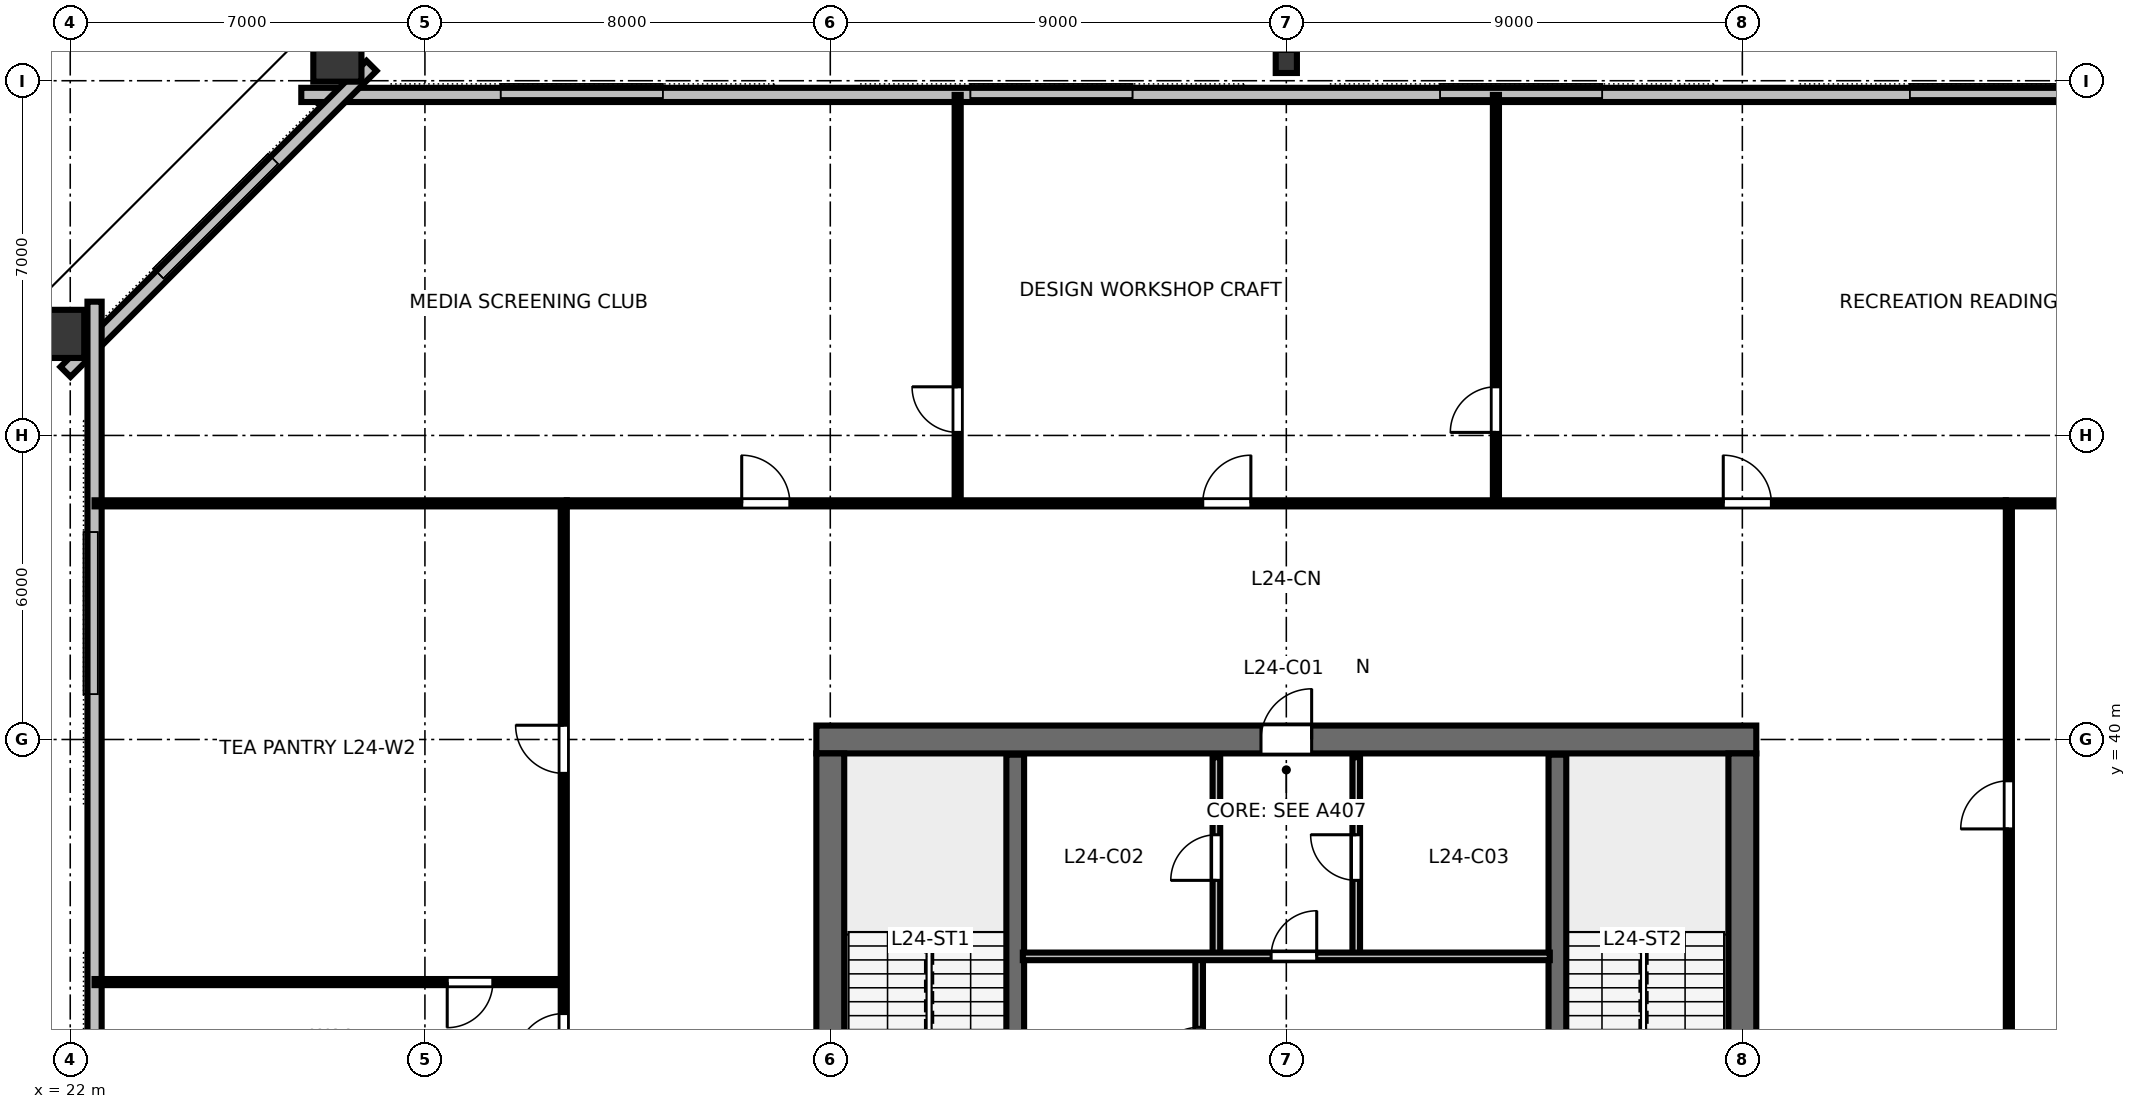
"""IFC4 building model, lengths in metres.
Left out: names, types, materials, properties, quantities, classifications, styles, units other than length and angle.
Written with IfcOpenShell. Run it as: python <this file> out.ifc"""

import sys

from ifc_helpers import new_model, si_unit, direction, frame, frame_2d, origin, origin_2d, place, context, subcontext, project, spatial, rectangle, hollow_rectangle, i_section, extrude, element, fill, save


model = new_model("IFC4")
c1 = context("Model", 3, precision=1e-05, world=origin(), true_north=direction((0.0, 1.0)))
c2 = subcontext(c1, "Body", "Model", "MODEL_VIEW")
j1 = project(units=[si_unit("LENGTHUNIT", "METRE"), si_unit("PLANEANGLEUNIT", "RADIAN")], contexts=[c1])
p1 = place(None, origin())
s1 = spatial("IfcSite", under=j1, at=p1, CompositionType="ELEMENT")
p2 = place(p1, origin())
s2 = spatial("IfcBuilding", under=s1, at=p2, CompositionType="ELEMENT")
p3 = place(p2, frame((0.0, 0.0, 95.2)))
s3 = spatial("IfcBuildingStorey", under=s2, at=p3, CompositionType="ELEMENT", Elevation=95.2)
p4 = place(p3, frame((36.725, 40.0, 0.0), z_axis=(0.0, 0.0, 1.0), x_axis=(1.0, 0.0, 0.0)))
e1 = element("IfcWall", 1, at=p4, inside=s3, PredefinedType="SHEAR", context=c2, shape_type="SweptSolid", body=[
    extrude(rectangle(XDim=18.55, YDim=0.55, at=frame_2d((9.275, 0.0))), origin(), (0.0, 0.0, 1.0), 3.36),
])
p5 = place(p4, frame((8.775, 0.0, 0.0)))
e2 = element("IfcOpeningElement", 2, at=p5, cuts=e1, PredefinedType="OPENING", context=c2, shape_type="SweptSolid", body=[
    extrude(rectangle(XDim=1.0, YDim=2.15, at=frame_2d((0.5, 1.075))), frame((0.0, 0.285, 0.0), z_axis=(0.0, -1.0, 0.0), x_axis=(1.0, 0.0, 0.0)), (0.0, 0.0, 1.0), 0.57),
])
p6 = place(p3, frame((37.0, 24.275, 0.0), z_axis=(0.0, 0.0, 1.0), x_axis=(0.0, 1.0, 0.0)))
e3 = element("IfcWall", 3, at=p6, inside=s3, PredefinedType="SHEAR", context=c2, shape_type="SweptSolid", body=[
    extrude(rectangle(XDim=15.45, YDim=0.55, at=frame_2d((7.725, 0.0))), origin(), (0.0, 0.0, 1.0), 3.36),
])
p7 = place(p6, frame((5.25, 0.0, 0.0)))
e4 = element("IfcOpeningElement", 4, at=p7, cuts=e3, PredefinedType="OPENING", context=c2, shape_type="SweptSolid", body=[
    extrude(rectangle(XDim=1.15, YDim=2.15, at=frame_2d((0.575, 1.075))), frame((0.0, 0.285, 0.0), z_axis=(0.0, -1.0, 0.0), x_axis=(1.0, 0.0, 0.0)), (0.0, 0.0, 1.0), 0.57),
])
p8 = place(p3, frame((55.0, 24.275, 0.0), z_axis=(0.0, 0.0, 1.0), x_axis=(0.0, 1.0, 0.0)))
e5 = element("IfcWall", 5, at=p8, inside=s3, PredefinedType="SHEAR", context=c2, shape_type="SweptSolid", body=[
    extrude(rectangle(XDim=15.45, YDim=0.55, at=frame_2d((7.725, 0.0))), origin(), (0.0, 0.0, 1.0), 3.36),
])
p9 = place(p8, frame((5.25, 0.0, 0.0)))
e6 = element("IfcOpeningElement", 6, at=p9, cuts=e5, PredefinedType="OPENING", context=c2, shape_type="SweptSolid", body=[
    extrude(rectangle(XDim=1.15, YDim=2.15, at=frame_2d((0.575, 1.075))), frame((0.0, 0.285, 0.0), z_axis=(0.0, -1.0, 0.0), x_axis=(1.0, 0.0, 0.0)), (0.0, 0.0, 1.0), 0.57),
])
p10 = place(p3, frame((46.0, 53.38, 0.0), z_axis=(0.0, 0.0, 1.0), x_axis=(1.0, 0.0, 0.0)))
e7 = element("IfcColumn", 7, at=p10, inside=s3, PredefinedType="COLUMN", context=c2, shape_type="SweptSolid", body=[
    extrude(i_section(OverallWidth=0.418, OverallDepth=0.455, WebThickness=0.042, FlangeThickness=0.068, FilletRadius=0.025, at=origin_2d()), origin(), (0.0, 0.0, 1.0), 3.358),
])
for number, where, z_axis, x_axis in (
    (8, (27.272, 53.556, 0.0), (0.0, 0.0, 1.0), (1.0, 0.0, 0.0)),
    (9, (21.701, 48.004, 0.0), (0.0, 0.0, 1.0), (0.0, 1.0, 0.0)),
):
    element("IfcColumn", number, at=place(p3, frame(where, z_axis=z_axis, x_axis=x_axis)), inside=s3, PredefinedType="COLUMN", context=c2, shape_type="SweptSolid", body=[
        extrude(hollow_rectangle(XDim=0.95, YDim=1.15, WallThickness=0.06, at=origin_2d()), origin(), (0.0, 0.0, 1.0), 3.358),
    ])
p11 = place(p3, frame((65.44, 52.72, 0.0), z_axis=(0.0, 0.0, 1.0), x_axis=(-1.0, 0.0, 0.0)))
e10 = element("IfcWall", 10, at=p11, inside=s3, PredefinedType="STANDARD", context=c2, shape_type="SweptSolid", body=[
    extrude(rectangle(XDim=38.88, YDim=0.28, at=frame_2d((19.44, 0.0))), origin(), (0.0, 0.0, 1.0), 3.36),
])
p12 = place(p3, frame((27.946, 53.294, 0.0), z_axis=(0.0, 0.0, 1.0), x_axis=(-0.707106781187, -0.707106781187, 0.0)))
e11 = element("IfcWall", 11, at=p12, inside=s3, PredefinedType="STANDARD", context=c2, shape_type="SweptSolid", body=[
    extrude(rectangle(XDim=8.541, YDim=0.28, at=frame_2d((4.271, 0.0))), origin(), (0.0, 0.0, 1.0), 3.36),
])
p13 = place(p3, frame((22.48, 48.64, 0.0), z_axis=(0.0, 0.0, 1.0), x_axis=(0.0, -1.0, 0.0)))
e12 = element("IfcWall", 12, at=p13, inside=s3, PredefinedType="STANDARD", context=c2, shape_type="SweptSolid", body=[
    extrude(rectangle(XDim=33.28, YDim=0.28, at=frame_2d((16.64, 0.0))), origin(), (0.0, 0.0, 1.0), 3.36),
])
for number, where, z_axis, x_axis in (
    (13, (40.65, 32.0, 0.0), (0.0, 0.0, 1.0), (0.0, 1.0, 0.0)),
    (14, (51.35, 32.0, 0.0), (0.0, 0.0, 1.0), (0.0, 1.0, 0.0)),
):
    element("IfcWall", number, at=place(p3, frame(where, z_axis=z_axis, x_axis=x_axis)), inside=s3, PredefinedType="SHEAR", context=c2, shape_type="SweptSolid", body=[
        extrude(rectangle(XDim=7.7, YDim=0.35, at=frame_2d((3.85, 0.0))), origin(), (0.0, 0.0, 1.0), 3.6),
    ])
p14 = place(p3, frame((44.62, 35.72, 0.0), z_axis=(0.0, 0.0, 1.0), x_axis=(0.0, 1.0, 0.0)))
e15 = element("IfcWall", 15, at=p14, inside=s3, PredefinedType="PARTITIONING", context=c2, shape_type="SweptSolid", body=[
    extrude(rectangle(XDim=3.93, YDim=0.15, at=frame_2d((1.965, 0.0))), origin(), (0.0, 0.0, 1.0), 3.36),
])
p15 = place(p14, frame((1.5, 0.0, 0.0)))
e16 = element("IfcOpeningElement", 16, at=p15, cuts=e15, PredefinedType="OPENING", context=c2, shape_type="SweptSolid", body=[
    extrude(rectangle(XDim=0.9, YDim=2.15, at=frame_2d((0.45, 1.075))), frame((0.0, 0.085, 0.0), z_axis=(0.0, -1.0, 0.0), x_axis=(1.0, 0.0, 0.0)), (0.0, 0.0, 1.0), 0.17),
])
p16 = place(p3, frame((47.38, 35.72, 0.0), z_axis=(0.0, 0.0, 1.0), x_axis=(0.0, 1.0, 0.0)))
e17 = element("IfcWall", 17, at=p16, inside=s3, PredefinedType="PARTITIONING", context=c2, shape_type="SweptSolid", body=[
    extrude(rectangle(XDim=3.93, YDim=0.15, at=frame_2d((1.965, 0.0))), origin(), (0.0, 0.0, 1.0), 3.36),
])
p17 = place(p16, frame((1.5, 0.0, 0.0)))
e18 = element("IfcOpeningElement", 18, at=p17, cuts=e17, PredefinedType="OPENING", context=c2, shape_type="SweptSolid", body=[
    extrude(rectangle(XDim=0.9, YDim=2.15, at=frame_2d((0.45, 1.075))), frame((0.0, 0.085, 0.0), z_axis=(0.0, -1.0, 0.0), x_axis=(1.0, 0.0, 0.0)), (0.0, 0.0, 1.0), 0.17),
])
p18 = place(p3, frame((44.28, 32.05, 0.0), z_axis=(0.0, 0.0, 1.0), x_axis=(0.0, 1.0, 0.0)))
e19 = element("IfcWall", 19, at=p18, inside=s3, PredefinedType="PARTITIONING", context=c2, shape_type="SweptSolid", body=[
    extrude(rectangle(XDim=3.67, YDim=0.15, at=frame_2d((1.835, 0.0))), origin(), (0.0, 0.0, 1.0), 3.36),
])
p19 = place(p18, frame((1.35, 0.0, 0.0)))
e20 = element("IfcOpeningElement", 20, at=p19, cuts=e19, PredefinedType="OPENING", context=c2, shape_type="SweptSolid", body=[
    extrude(rectangle(XDim=0.92, YDim=2.15, at=frame_2d((0.46, 1.075))), frame((0.0, 0.085, 0.0), z_axis=(0.0, -1.0, 0.0), x_axis=(1.0, 0.0, 0.0)), (0.0, 0.0, 1.0), 0.17),
])
p20 = place(p3, frame((40.8, 35.72, 0.0), z_axis=(0.0, 0.0, 1.0), x_axis=(1.0, 0.0, 0.0)))
e21 = element("IfcWall", 21, at=p20, inside=s3, PredefinedType="PARTITIONING", context=c2, shape_type="SweptSolid", body=[
    extrude(rectangle(XDim=10.4, YDim=0.15, at=frame_2d((5.2, 0.0))), origin(), (0.0, 0.0, 1.0), 3.36),
])
p21 = place(p20, frame((4.9, 0.0, 0.0)))
e22 = element("IfcOpeningElement", 22, at=p21, cuts=e21, PredefinedType="OPENING", context=c2, shape_type="SweptSolid", body=[
    extrude(rectangle(XDim=0.9, YDim=2.15, at=frame_2d((0.45, 1.075))), frame((0.0, 0.085, 0.0), z_axis=(0.0, -1.0, 0.0), x_axis=(1.0, 0.0, 0.0)), (0.0, 0.0, 1.0), 0.17),
])
p22 = place(p3, frame((39.514, 44.66, 0.0), z_axis=(0.0, 0.0, 1.0), x_axis=(0.0, 1.0, 0.0)))
e23 = element("IfcWall", 23, at=p22, inside=s3, PredefinedType="PARTITIONING", context=c2, shape_type="SweptSolid", body=[
    extrude(rectangle(XDim=8.06, YDim=0.12, at=frame_2d((4.03, 0.0))), origin(), (0.0, 0.0, 1.0), 2.64),
])
p23 = place(p22, frame((1.4, 0.0, 0.0)))
e24 = element("IfcOpeningElement", 24, at=p23, cuts=e23, PredefinedType="OPENING", context=c2, shape_type="SweptSolid", body=[
    extrude(rectangle(XDim=0.9, YDim=2.15, at=frame_2d((0.45, 1.075))), frame((0.0, 0.07, 0.0), z_axis=(0.0, -1.0, 0.0), x_axis=(1.0, 0.0, 0.0)), (0.0, 0.0, 1.0), 0.14),
])
p24 = place(p3, frame((50.137, 44.66, 0.0), z_axis=(0.0, 0.0, 1.0), x_axis=(0.0, 1.0, 0.0)))
e25 = element("IfcWall", 25, at=p24, inside=s3, PredefinedType="PARTITIONING", context=c2, shape_type="SweptSolid", body=[
    extrude(rectangle(XDim=8.06, YDim=0.12, at=frame_2d((4.03, 0.0))), origin(), (0.0, 0.0, 1.0), 2.64),
])
p25 = place(p24, frame((1.4, 0.0, 0.0)))
e26 = element("IfcOpeningElement", 26, at=p25, cuts=e25, PredefinedType="OPENING", context=c2, shape_type="SweptSolid", body=[
    extrude(rectangle(XDim=0.9, YDim=2.15, at=frame_2d((0.45, 1.075))), frame((0.0, 0.07, 0.0), z_axis=(0.0, -1.0, 0.0), x_axis=(1.0, 0.0, 0.0)), (0.0, 0.0, 1.0), 0.14),
])
p26 = place(p3, frame((31.8, 44.66, 0.0), z_axis=(0.0, 0.0, 1.0), x_axis=(1.0, 0.0, 0.0)))
e27 = element("IfcWall", 27, at=p26, inside=s3, PredefinedType="PARTITIONING", context=c2, shape_type="SweptSolid", body=[
    extrude(rectangle(XDim=28.4, YDim=0.12, at=frame_2d((14.2, 0.0))), origin(), (0.0, 0.0, 1.0), 2.64),
])
p27 = place(p26, frame((3.452, 0.0, 0.0)))
e28 = element("IfcOpeningElement", 28, at=p27, cuts=e27, PredefinedType="OPENING", context=c2, shape_type="SweptSolid", body=[
    extrude(rectangle(XDim=0.95, YDim=2.15, at=frame_2d((0.475, 1.075))), frame((0.0, 0.07, 0.0), z_axis=(0.0, -1.0, 0.0), x_axis=(1.0, 0.0, 0.0)), (0.0, 0.0, 1.0), 0.14),
])
p28 = place(p26, frame((12.551, 0.0, 0.0)))
e29 = element("IfcOpeningElement", 29, at=p28, cuts=e27, PredefinedType="OPENING", context=c2, shape_type="SweptSolid", body=[
    extrude(rectangle(XDim=0.95, YDim=2.15, at=frame_2d((0.475, 1.075))), frame((0.0, 0.07, 0.0), z_axis=(0.0, -1.0, 0.0), x_axis=(1.0, 0.0, 0.0)), (0.0, 0.0, 1.0), 0.14),
])
p29 = place(p26, frame((22.823, 0.0, 0.0)))
e30 = element("IfcOpeningElement", 30, at=p29, cuts=e27, PredefinedType="OPENING", context=c2, shape_type="SweptSolid", body=[
    extrude(rectangle(XDim=0.95, YDim=2.15, at=frame_2d((0.475, 1.075))), frame((0.0, 0.07, 0.0), z_axis=(0.0, -1.0, 0.0), x_axis=(1.0, 0.0, 0.0)), (0.0, 0.0, 1.0), 0.14),
])
p30 = place(p3, frame((31.74, 35.213, 0.0), z_axis=(0.0, 0.0, 1.0), x_axis=(-1.0, 0.0, 0.0)))
e31 = element("IfcWall", 31, at=p30, inside=s3, PredefinedType="PARTITIONING", context=c2, shape_type="SweptSolid", body=[
    extrude(rectangle(XDim=9.26, YDim=0.12, at=frame_2d((4.63, 0.0))), origin(), (0.0, 0.0, 1.0), 2.64),
])
p31 = place(p30, frame((1.4, 0.0, 0.0)))
e32 = element("IfcOpeningElement", 32, at=p31, cuts=e31, PredefinedType="OPENING", context=c2, shape_type="SweptSolid", body=[
    extrude(rectangle(XDim=0.9, YDim=2.15, at=frame_2d((0.45, 1.075))), frame((0.0, 0.07, 0.0), z_axis=(0.0, -1.0, 0.0), x_axis=(1.0, 0.0, 0.0)), (0.0, 0.0, 1.0), 0.14),
])
p32 = place(p3, frame((31.74, 33.02, 0.0), z_axis=(0.0, 0.0, 1.0), x_axis=(0.0, 1.0, 0.0)))
e33 = element("IfcWall", 33, at=p32, inside=s3, PredefinedType="PARTITIONING", context=c2, shape_type="SweptSolid", body=[
    extrude(rectangle(XDim=11.58, YDim=0.12, at=frame_2d((5.79, 0.0))), origin(), (0.0, 0.0, 1.0), 2.64),
])
p33 = place(p32, frame((0.621, 0.0, 0.0)))
e34 = element("IfcOpeningElement", 34, at=p33, cuts=e33, PredefinedType="OPENING", context=c2, shape_type="SweptSolid", body=[
    extrude(rectangle(XDim=0.95, YDim=2.15, at=frame_2d((0.475, 1.075))), frame((0.0, 0.07, 0.0), z_axis=(0.0, -1.0, 0.0), x_axis=(1.0, 0.0, 0.0)), (0.0, 0.0, 1.0), 0.14),
])
p34 = place(p32, frame((6.311, 0.0, 0.0)))
e35 = element("IfcOpeningElement", 35, at=p34, cuts=e33, PredefinedType="OPENING", context=c2, shape_type="SweptSolid", body=[
    extrude(rectangle(XDim=0.95, YDim=2.15, at=frame_2d((0.475, 1.075))), frame((0.0, 0.07, 0.0), z_axis=(0.0, -1.0, 0.0), x_axis=(1.0, 0.0, 0.0)), (0.0, 0.0, 1.0), 0.14),
])
p35 = place(p3, frame((60.26, 33.02, 0.0), z_axis=(0.0, 0.0, 1.0), x_axis=(0.0, 1.0, 0.0)))
e36 = element("IfcWall", 36, at=p35, inside=s3, PredefinedType="PARTITIONING", context=c2, shape_type="SweptSolid", body=[
    extrude(rectangle(XDim=11.58, YDim=0.12, at=frame_2d((5.79, 0.0))), origin(), (0.0, 0.0, 1.0), 2.64),
])
p36 = place(p35, frame((5.215, 0.0, 0.0)))
e37 = element("IfcOpeningElement", 37, at=p36, cuts=e36, PredefinedType="OPENING", context=c2, shape_type="SweptSolid", body=[
    extrude(rectangle(XDim=0.95, YDim=2.15, at=frame_2d((0.475, 1.075))), frame((0.0, 0.07, 0.0), z_axis=(0.0, -1.0, 0.0), x_axis=(1.0, 0.0, 0.0)), (0.0, 0.0, 1.0), 0.14),
])
for number, where, z_axis, x_axis in (
    (38, (31.8, 44.66, 0.0), (0.0, 0.0, 1.0), (-1.0, 0.0, 0.0)),
    (39, (60.2, 44.66, 0.0), (0.0, 0.0, 1.0), (1.0, 0.0, 0.0)),
):
    element("IfcWall", number, at=place(p3, frame(where, z_axis=z_axis, x_axis=x_axis)), inside=s3, PredefinedType="PARTITIONING", context=c2, shape_type="SweptSolid", body=[
        extrude(rectangle(XDim=9.32, YDim=0.12, at=frame_2d((4.66, 0.0))), origin(), (0.0, 0.0, 1.0), 2.64),
    ])
p37 = place(p5, origin())
e40 = element("IfcDoor", 40, at=p37, inside=s3, OperationType="SINGLE_SWING_RIGHT", PredefinedType="DOOR", context=c2, shape_type="SweptSolid", body=[
    extrude(rectangle(XDim=1.0, YDim=2.15, at=frame_2d((0.5, 1.075))), frame((0.0, 0.025, 0.0), z_axis=(0.0, -1.0, 0.0), x_axis=(1.0, 0.0, 0.0)), (0.0, 0.0, 1.0), 0.05),
])
fill(e2, e40)
p38 = place(p15, origin())
e41 = element("IfcDoor", 41, at=p38, inside=s3, OperationType="SINGLE_SWING_LEFT", PredefinedType="DOOR", context=c2, shape_type="SweptSolid", body=[
    extrude(rectangle(XDim=0.9, YDim=2.15, at=frame_2d((0.45, 1.075))), frame((0.0, 0.025, 0.0), z_axis=(0.0, -1.0, 0.0), x_axis=(1.0, 0.0, 0.0)), (0.0, 0.0, 1.0), 0.05),
])
fill(e16, e41)
p39 = place(p17, origin())
e42 = element("IfcDoor", 42, at=p39, inside=s3, OperationType="SINGLE_SWING_RIGHT", PredefinedType="DOOR", context=c2, shape_type="SweptSolid", body=[
    extrude(rectangle(XDim=0.9, YDim=2.15, at=frame_2d((0.45, 1.075))), frame((0.0, 0.025, 0.0), z_axis=(0.0, -1.0, 0.0), x_axis=(1.0, 0.0, 0.0)), (0.0, 0.0, 1.0), 0.05),
])
fill(e18, e42)
p40 = place(p19, origin())
e43 = element("IfcDoor", 43, at=p40, inside=s3, OperationType="SINGLE_SWING_LEFT", PredefinedType="DOOR", context=c2, shape_type="SweptSolid", body=[
    extrude(rectangle(XDim=0.92, YDim=2.15, at=frame_2d((0.46, 1.075))), frame((0.0, 0.025, 0.0), z_axis=(0.0, -1.0, 0.0), x_axis=(1.0, 0.0, 0.0)), (0.0, 0.0, 1.0), 0.05),
])
fill(e20, e43)
p41 = place(p21, origin())
e44 = element("IfcDoor", 44, at=p41, inside=s3, OperationType="SINGLE_SWING_RIGHT", PredefinedType="DOOR", context=c2, shape_type="SweptSolid", body=[
    extrude(rectangle(XDim=0.9, YDim=2.15, at=frame_2d((0.45, 1.075))), frame((0.0, 0.025, 0.0), z_axis=(0.0, -1.0, 0.0), x_axis=(1.0, 0.0, 0.0)), (0.0, 0.0, 1.0), 0.05),
])
fill(e22, e44)
p42 = place(p23, origin())
e45 = element("IfcDoor", 45, at=p42, inside=s3, OperationType="SINGLE_SWING_RIGHT", PredefinedType="DOOR", context=c2, shape_type="SweptSolid", body=[
    extrude(rectangle(XDim=0.9, YDim=2.15, at=frame_2d((0.45, 1.075))), frame((0.0, 0.025, 0.0), z_axis=(0.0, -1.0, 0.0), x_axis=(1.0, 0.0, 0.0)), (0.0, 0.0, 1.0), 0.05),
])
fill(e24, e45)
p43 = place(p25, origin())
e46 = element("IfcDoor", 46, at=p43, inside=s3, OperationType="SINGLE_SWING_LEFT", PredefinedType="DOOR", context=c2, shape_type="SweptSolid", body=[
    extrude(rectangle(XDim=0.9, YDim=2.15, at=frame_2d((0.45, 1.075))), frame((0.0, 0.025, 0.0), z_axis=(0.0, -1.0, 0.0), x_axis=(1.0, 0.0, 0.0)), (0.0, 0.0, 1.0), 0.05),
])
fill(e26, e46)
p44 = place(p27, origin())
e47 = element("IfcDoor", 47, at=p44, inside=s3, OperationType="SINGLE_SWING_LEFT", PredefinedType="DOOR", context=c2, shape_type="SweptSolid", body=[
    extrude(rectangle(XDim=0.95, YDim=2.15, at=frame_2d((0.475, 1.075))), frame((0.0, 0.025, 0.0), z_axis=(0.0, -1.0, 0.0), x_axis=(1.0, 0.0, 0.0)), (0.0, 0.0, 1.0), 0.05),
])
fill(e28, e47)
p45 = place(p28, origin())
e48 = element("IfcDoor", 48, at=p45, inside=s3, OperationType="SINGLE_SWING_RIGHT", PredefinedType="DOOR", context=c2, shape_type="SweptSolid", body=[
    extrude(rectangle(XDim=0.95, YDim=2.15, at=frame_2d((0.475, 1.075))), frame((0.0, 0.025, 0.0), z_axis=(0.0, -1.0, 0.0), x_axis=(1.0, 0.0, 0.0)), (0.0, 0.0, 1.0), 0.05),
])
fill(e29, e48)
p46 = place(p29, origin())
e49 = element("IfcDoor", 49, at=p46, inside=s3, OperationType="SINGLE_SWING_LEFT", PredefinedType="DOOR", context=c2, shape_type="SweptSolid", body=[
    extrude(rectangle(XDim=0.95, YDim=2.15, at=frame_2d((0.475, 1.075))), frame((0.0, 0.025, 0.0), z_axis=(0.0, -1.0, 0.0), x_axis=(1.0, 0.0, 0.0)), (0.0, 0.0, 1.0), 0.05),
])
fill(e30, e49)
p47 = place(p31, origin())
e50 = element("IfcDoor", 50, at=p47, inside=s3, OperationType="SINGLE_SWING_RIGHT", PredefinedType="DOOR", context=c2, shape_type="SweptSolid", body=[
    extrude(rectangle(XDim=0.9, YDim=2.15, at=frame_2d((0.45, 1.075))), frame((0.0, 0.025, 0.0), z_axis=(0.0, -1.0, 0.0), x_axis=(1.0, 0.0, 0.0)), (0.0, 0.0, 1.0), 0.05),
])
fill(e32, e50)
p48 = place(p33, origin())
e51 = element("IfcDoor", 51, at=p48, inside=s3, OperationType="SINGLE_SWING_LEFT", PredefinedType="DOOR", context=c2, shape_type="SweptSolid", body=[
    extrude(rectangle(XDim=0.95, YDim=2.15, at=frame_2d((0.475, 1.075))), frame((0.0, 0.025, 0.0), z_axis=(0.0, -1.0, 0.0), x_axis=(1.0, 0.0, 0.0)), (0.0, 0.0, 1.0), 0.05),
])
fill(e34, e51)
p49 = place(p34, origin())
e52 = element("IfcDoor", 52, at=p49, inside=s3, OperationType="SINGLE_SWING_RIGHT", PredefinedType="DOOR", context=c2, shape_type="SweptSolid", body=[
    extrude(rectangle(XDim=0.95, YDim=2.15, at=frame_2d((0.475, 1.075))), frame((0.0, 0.025, 0.0), z_axis=(0.0, -1.0, 0.0), x_axis=(1.0, 0.0, 0.0)), (0.0, 0.0, 1.0), 0.05),
])
fill(e35, e52)
p50 = place(p36, origin())
e53 = element("IfcDoor", 53, at=p50, inside=s3, OperationType="SINGLE_SWING_LEFT", PredefinedType="DOOR", context=c2, shape_type="SweptSolid", body=[
    extrude(rectangle(XDim=0.95, YDim=2.15, at=frame_2d((0.475, 1.075))), frame((0.0, 0.025, 0.0), z_axis=(0.0, -1.0, 0.0), x_axis=(1.0, 0.0, 0.0)), (0.0, 0.0, 1.0), 0.05),
])
fill(e37, e53)
save(model, sys.argv[1])
